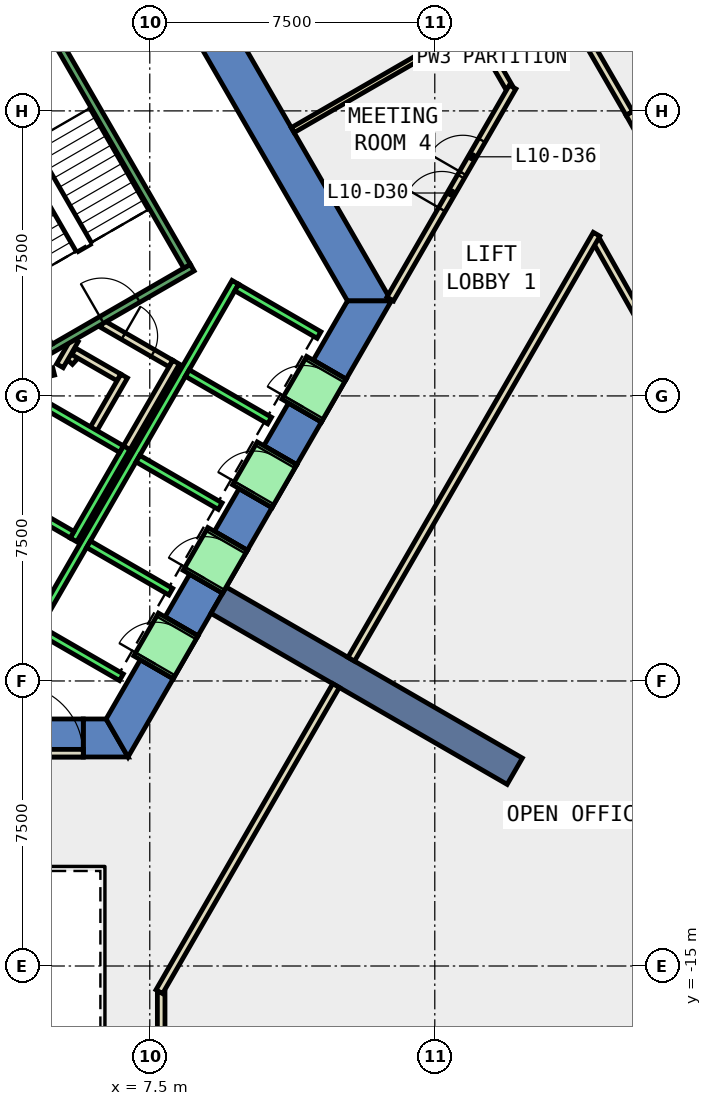
"""IFC4 building model, lengths in metres.
Left out: names, types, materials, properties, quantities, classifications, styles, units other than length and angle.
Written with IfcOpenShell. Run it as: python <this file> out.ifc"""

import sys

from ifc_helpers import new_model, si_unit, direction, frame, frame_2d, origin, place, context, subcontext, project, spatial, polyline, rectangle, outline, extrude, element, fill, save


model = new_model("IFC4")
c1 = context("Model", 3, precision=1e-05, world=origin(), true_north=direction((0.0, 1.0)))
c2 = subcontext(c1, "Body", "Model", "MODEL_VIEW")
j1 = project(units=[si_unit("LENGTHUNIT", "METRE"), si_unit("PLANEANGLEUNIT", "RADIAN")], contexts=[c1])
p1 = place(None, origin())
s1 = spatial("IfcSite", under=j1, at=p1, CompositionType="ELEMENT")
p2 = place(p1, origin())
s2 = spatial("IfcBuilding", under=s1, at=p2, CompositionType="ELEMENT")
p3 = place(p2, frame((0.0, 0.0, 51.8)))
s3 = spatial("IfcBuildingStorey", under=s2, at=p3, CompositionType="ELEMENT", Elevation=51.8)
p4 = place(p3, frame((0.0, 0.0, -0.4)))
e1 = element("IfcWall", 1, at=p4, inside=s3, PredefinedType="SHEAR", context=c2, shape_type="SweptSolid", body=[
    extrude(outline(polyline([(8.517, 11.748), (7.651, 11.248), (12.702, 2.5), (13.856, 2.5), (8.517, 11.748)])), origin(), (0.0, 0.0, 1.0), 4.2),
])
p5 = place(p3, frame((0.0, 0.0, -0.4)))
e2 = element("IfcWall", 2, at=p5, inside=s3, PredefinedType="SHEAR", context=c2, shape_type="SweptSolid", body=[
    extrude(outline(polyline([(5.75, -8.5), (5.75, -9.5), (6.928, -9.5), (6.351, -8.5), (5.75, -8.5)])), origin(), (0.0, 0.0, 1.0), 4.2),
])
p6 = place(p3, frame((0.0, 0.0, 3.6)))
e3 = element("IfcWall", 3, at=p6, inside=s3, PredefinedType="SHEAR", context=c2, shape_type="SweptSolid", body=[
    extrude(outline(polyline([(5.75, -9.5), (5.75, -8.5), (3.75, -8.5), (3.75, -9.5), (5.75, -9.5)])), origin(), (0.0, 0.0, 1.0), 0.2),
])
p7 = place(p3, frame((0.0, 0.0, -0.4)))
e4 = element("IfcWall", 4, at=p7, inside=s3, PredefinedType="SHEAR", context=c2, shape_type="SweptSolid", body=[
    extrude(outline(polyline([(8.117, -7.44), (7.252, -6.94), (6.351, -8.5), (6.928, -9.5), (8.117, -7.44)])), origin(), (0.0, 0.0, 1.0), 4.2),
])
p8 = place(p3, frame((0.0, 0.0, -0.4)))
e5 = element("IfcWall", 5, at=p8, inside=s3, PredefinedType="SHEAR", context=c2, shape_type="SweptSolid", body=[
    extrude(outline(polyline([(9.417, -5.189), (8.551, -4.689), (7.902, -5.814), (8.767, -6.314), (9.417, -5.189)])), origin(), (0.0, 0.0, 1.0), 4.2),
])
p9 = place(p3, frame((0.0, 0.0, -0.4)))
e6 = element("IfcWall", 6, at=p9, inside=s3, PredefinedType="SHEAR", context=c2, shape_type="SweptSolid", body=[
    extrude(outline(polyline([(10.717, -2.937), (9.851, -2.437), (9.201, -3.563), (10.067, -4.063), (10.717, -2.937)])), origin(), (0.0, 0.0, 1.0), 4.2),
])
p10 = place(p3, frame((0.0, 0.0, -0.4)))
e7 = element("IfcWall", 7, at=p10, inside=s3, PredefinedType="SHEAR", context=c2, shape_type="SweptSolid", body=[
    extrude(outline(polyline([(12.017, -0.686), (11.151, -0.186), (10.501, -1.311), (11.367, -1.811), (12.017, -0.686)])), origin(), (0.0, 0.0, 1.0), 4.2),
])
p11 = place(p3, frame((0.0, 0.0, -0.4)))
e8 = element("IfcWall", 8, at=p11, inside=s3, PredefinedType="SHEAR", context=c2, shape_type="SweptSolid", body=[
    extrude(outline(polyline([(11.801, 0.94), (12.667, 0.44), (13.856, 2.5), (12.702, 2.5), (11.801, 0.94)])), origin(), (0.0, 0.0, 1.0), 4.2),
])
p12 = place(p3, frame((0.0, 0.0, 3.6)))
e9 = element("IfcWall", 9, at=p12, inside=s3, PredefinedType="SHEAR", context=c2, shape_type="SweptSolid", body=[
    extrude(outline(polyline([(8.767, -6.314), (7.902, -5.814), (7.252, -6.94), (8.117, -7.44), (8.767, -6.314)])), origin(), (0.0, 0.0, 1.0), 0.2),
])
p13 = place(p3, frame((0.0, 0.0, 3.6)))
e10 = element("IfcWall", 10, at=p13, inside=s3, PredefinedType="SHEAR", context=c2, shape_type="SweptSolid", body=[
    extrude(outline(polyline([(10.067, -4.063), (9.201, -3.563), (8.551, -4.689), (9.417, -5.189), (10.067, -4.063)])), origin(), (0.0, 0.0, 1.0), 0.2),
])
p14 = place(p3, frame((0.0, 0.0, 3.6)))
e11 = element("IfcWall", 11, at=p14, inside=s3, PredefinedType="SHEAR", context=c2, shape_type="SweptSolid", body=[
    extrude(outline(polyline([(11.367, -1.811), (10.501, -1.311), (9.851, -2.437), (10.717, -2.937), (11.367, -1.811)])), origin(), (0.0, 0.0, 1.0), 0.2),
])
p15 = place(p3, frame((0.0, 0.0, 3.6)))
e12 = element("IfcWall", 12, at=p15, inside=s3, PredefinedType="SHEAR", context=c2, shape_type="SweptSolid", body=[
    extrude(outline(polyline([(12.667, 0.44), (11.801, 0.94), (11.151, -0.186), (12.017, -0.686), (12.667, 0.44)])), origin(), (0.0, 0.0, 1.0), 0.2),
])
p16 = place(p3, frame((9.31, -5.375, -0.4), z_axis=(0.0, 0.0, 1.0), x_axis=(0.866017533419, -0.500013631625, 0.0)))
e13 = element("IfcWall", 13, at=p16, inside=s3, PredefinedType="SHEAR", context=c2, shape_type="SweptSolid", body=[
    extrude(rectangle(XDim=9.0, YDim=0.8, at=frame_2d((4.5, 0.0))), origin(), (0.0, 0.0, 1.0), 4.2),
])
p17 = place(p3, frame((16.948, 8.128, 0.0), z_axis=(0.0, 0.0, 1.0), x_axis=(-0.499931460552, 0.866064971437, 0.0)))
e14 = element("IfcWall", 14, at=p17, inside=s3, PredefinedType="PARTITIONING", context=c2, shape_type="SweptSolid", body=[
    extrude(rectangle(XDim=1.786, YDim=0.2, at=frame_2d((0.893, 0.0))), origin(), (0.0, 0.0, 1.0), 3.8),
])
p18 = place(p3, frame((21.585, -0.045, 0.0), z_axis=(0.0, 0.0, 1.0), x_axis=(-0.491542684896, 0.870853483042, 0.0)))
e15 = element("IfcWall", 15, at=p18, inside=s3, PredefinedType="PARTITIONING", context=c2, shape_type="SweptSolid", body=[
    extrude(rectangle(XDim=4.738, YDim=0.2, at=frame_2d((2.369, 0.0))), origin(), (0.0, 0.0, 1.0), 3.8),
])
p19 = place(p3, frame((16.46, 13.772, 0.0), z_axis=(0.0, 0.0, 1.0), x_axis=(0.500099745063, -0.865967808286, 0.0)))
e16 = element("IfcWall", 16, at=p19, inside=s3, PredefinedType="PARTITIONING", context=c2, shape_type="SweptSolid", body=[
    extrude(rectangle(XDim=7.319, YDim=0.2, at=frame_2d((3.659, 0.0))), origin(), (0.0, 0.0, 1.0), 3.8),
])
p20 = place(p19, frame((3.159, 0.0, 0.0)))
e17 = element("IfcOpeningElement", 17, at=p20, cuts=e16, PredefinedType="OPENING", context=c2, shape_type="SweptSolid", body=[
    extrude(rectangle(XDim=1.0, YDim=2.1, at=frame_2d((0.5, 1.05))), frame((0.0, 0.11, 0.0), z_axis=(0.0, -1.0, 0.0), x_axis=(1.0, 0.0, 0.0)), (0.0, 0.0, 1.0), 0.22),
])
p21 = place(p3, frame((20.12, 7.434, 0.0), z_axis=(0.0, 0.0, 1.0), x_axis=(0.491394823876, -0.87093692485, 0.0)))
e18 = element("IfcWall", 18, at=p21, inside=s3, PredefinedType="PARTITIONING", context=c2, shape_type="SweptSolid", body=[
    extrude(rectangle(XDim=3.547, YDim=0.2, at=frame_2d((1.773, 0.0))), origin(), (0.0, 0.0, 1.0), 3.8),
])
p22 = place(p3, frame((5.39, 0.898, 0.0), z_axis=(0.0, 0.0, 1.0), x_axis=(0.673828488714, 0.738887791073, 0.0)))
e19 = element("IfcWall", 19, at=p22, inside=s3, PredefinedType="PARTITIONING", context=c2, shape_type="SweptSolid", body=[
    extrude(rectangle(XDim=0.263, YDim=0.2, at=frame_2d((0.131, 0.0))), origin(), (0.0, 0.0, 1.0), 3.8),
])
p23 = place(p3, frame((5.499, 1.172, 0.0), z_axis=(0.0, 0.0, 1.0), x_axis=(0.866333505267, -0.499465972466, 0.0)))
e20 = element("IfcWall", 20, at=p23, inside=s3, PredefinedType="PARTITIONING", context=c2, shape_type="SweptSolid", body=[
    extrude(rectangle(XDim=1.374, YDim=0.2, at=frame_2d((0.687, 0.0))), origin(), (0.0, 0.0, 1.0), 3.8),
])
p24 = place(p3, frame((6.826, 0.522, 0.0), z_axis=(0.0, 0.0, 1.0), x_axis=(-0.500016722714, -0.866015748706, 0.0)))
e21 = element("IfcWall", 21, at=p24, inside=s3, PredefinedType="PARTITIONING", context=c2, shape_type="SweptSolid", body=[
    extrude(rectangle(XDim=1.7, YDim=0.2, at=frame_2d((0.85, 0.0))), origin(), (0.0, 0.0, 1.0), 3.8),
])
p25 = place(p3, frame((6.25, 1.894, 0.0), z_axis=(0.0, 0.0, 1.0), x_axis=(0.866043184279, -0.499969202016, 0.0)))
e22 = element("IfcWall", 22, at=p25, inside=s3, PredefinedType="PARTITIONING", context=c2, shape_type="SweptSolid", body=[
    extrude(rectangle(XDim=2.084, YDim=0.2, at=frame_2d((1.042, 0.0))), origin(), (0.0, 0.0, 1.0), 3.8),
])
p26 = place(p25, frame((0.642, 0.0, 0.0)))
e23 = element("IfcOpeningElement", 23, at=p26, cuts=e22, PredefinedType="OPENING", context=c2, shape_type="SweptSolid", body=[
    extrude(rectangle(XDim=0.9, YDim=2.1, at=frame_2d((0.45, 1.05))), frame((0.0, 0.11, 0.0), z_axis=(0.0, -1.0, 0.0), x_axis=(1.0, 0.0, 0.0)), (0.0, 0.0, 1.0), 0.22),
])
p27 = place(p3, frame((8.192, 0.888, 0.0), z_axis=(0.0, 0.0, 1.0), x_axis=(-0.499940625693, -0.866059680843, 0.0)))
e24 = element("IfcWall", 24, at=p27, inside=s3, PredefinedType="PARTITIONING", context=c2, shape_type="SweptSolid", body=[
    extrude(rectangle(XDim=2.68, YDim=0.2, at=frame_2d((1.34, 0.0))), origin(), (0.0, 0.0, 1.0), 3.8),
])
p28 = place(p3, frame((5.135, 0.793, 0.0), z_axis=(0.0, 0.0, 1.0), x_axis=(0.499526442893, 0.866298639529, 0.0)))
e25 = element("IfcWall", 25, at=p28, inside=s3, PredefinedType="PARTITIONING", context=c2, shape_type="SweptSolid", body=[
    extrude(rectangle(XDim=0.791, YDim=0.2, at=frame_2d((0.396, 0.0))), origin(), (0.0, 0.0, 1.0), 3.8),
])
p29 = place(p3, frame((16.104, 9.79, 0.0), z_axis=(0.0, 0.0, 1.0), x_axis=(-0.866023462144, -0.500003363005, 0.0)))
e26 = element("IfcWall", 26, at=p29, inside=s3, PredefinedType="PARTITIONING", context=c2, shape_type="SweptSolid", body=[
    extrude(rectangle(XDim=5.592, YDim=0.15, at=frame_2d((2.796, 0.0))), origin(), (0.0, 0.0, 1.0), 3.8),
])
p30 = place(p3, frame((13.827, 2.55, 0.0), z_axis=(0.0, 0.0, 1.0), x_axis=(0.500093193185, 0.865971591988, 0.0)))
e27 = element("IfcWall", 27, at=p30, inside=s3, PredefinedType="PARTITIONING", context=c2, shape_type="SweptSolid", body=[
    extrude(rectangle(XDim=6.441, YDim=0.2, at=frame_2d((3.221, 0.0))), origin(), (0.0, 0.0, 1.0), 3.8),
])
p31 = place(p30, frame((2.721, 0.0, 0.0)))
e28 = element("IfcOpeningElement", 28, at=p31, cuts=e27, PredefinedType="OPENING", context=c2, shape_type="SweptSolid", body=[
    extrude(rectangle(XDim=1.0, YDim=2.1, at=frame_2d((0.5, 1.05))), frame((0.0, 0.11, 0.0), z_axis=(0.0, -1.0, 0.0), x_axis=(1.0, 0.0, 0.0)), (0.0, 0.0, 1.0), 0.22),
])
p32 = place(p30, frame((3.821, 0.0, 0.0)))
e29 = element("IfcOpeningElement", 29, at=p32, cuts=e27, PredefinedType="OPENING", context=c2, shape_type="SweptSolid", body=[
    extrude(rectangle(XDim=1.0, YDim=2.1, at=frame_2d((0.5, 1.05))), frame((0.0, 0.11, 0.0), z_axis=(0.0, -1.0, 0.0), x_axis=(1.0, 0.0, 0.0)), (0.0, 0.0, 1.0), 0.22),
])
p33 = place(p3, frame((4.644, 0.564, 0.0), z_axis=(0.0, 0.0, 1.0), x_axis=(0.969929076366, 0.243387729394, 0.0)))
e30 = element("IfcWall", 30, at=p33, inside=s3, PredefinedType="PARTITIONING", context=c2, shape_type="SweptSolid", body=[
    extrude(rectangle(XDim=0.337, YDim=0.2, at=frame_2d((0.168, 0.0))), origin(), (0.0, 0.0, 1.0), 3.8),
])
p34 = place(p3, frame((7.8, -15.69, 0.0), z_axis=(0.0, 0.0, 1.0), x_axis=(0.0, -1.0, 0.0)))
e31 = element("IfcWall", 31, at=p34, inside=s3, PredefinedType="PARTITIONING", context=c2, shape_type="SweptSolid", body=[
    extrude(rectangle(XDim=2.919, YDim=0.2, at=frame_2d((1.459, 0.0))), origin(), (0.0, 0.0, 1.0), 3.8),
])
p35 = place(p3, frame((19.257, 4.255, 0.0), z_axis=(0.0, 0.0, 1.0), x_axis=(-0.499978317034, -0.866037922089, 0.0)))
e32 = element("IfcWall", 32, at=p35, inside=s3, PredefinedType="PARTITIONING", context=c2, shape_type="SweptSolid", body=[
    extrude(rectangle(XDim=12.913, YDim=0.2, at=frame_2d((6.456, 0.0))), origin(), (0.0, 0.0, 1.0), 3.8),
])
p36 = place(p3, frame((3.75, -9.4, 0.0), z_axis=(0.0, 0.0, 1.0), x_axis=(1.0, 0.0, 0.0)))
e33 = element("IfcWall", 33, at=p36, inside=s3, PredefinedType="PARTITIONING", context=c2, shape_type="SweptSolid", body=[
    extrude(rectangle(XDim=2.0, YDim=0.2, at=frame_2d((1.0, 0.0))), origin(), (0.0, 0.0, 1.0), 2.4),
])
p37 = place(p36, frame((0.19, 0.0, 0.0)))
e34 = element("IfcOpeningElement", 34, at=p37, cuts=e33, PredefinedType="OPENING", context=c2, shape_type="SweptSolid", body=[
    extrude(rectangle(XDim=1.8, YDim=2.1, at=frame_2d((0.9, 1.05))), frame((0.0, 0.11, 0.0), z_axis=(0.0, -1.0, 0.0), x_axis=(1.0, 0.0, 0.0)), (0.0, 0.0, 1.0), 0.22),
])
p38 = place(p3, frame((12.401, -7.621, 0.0), z_axis=(0.0, 0.0, 1.0), x_axis=(-0.499983724212, -0.866034800411, 0.0)))
e35 = element("IfcWall", 35, at=p38, inside=s3, PredefinedType="PARTITIONING", context=c2, shape_type="SweptSolid", body=[
    extrude(rectangle(XDim=9.302, YDim=0.2, at=frame_2d((4.651, 0.0))), origin(), (0.0, 0.0, 1.0), 3.8),
])
p39 = place(p3, frame((5.492, -3.788, 0.0), z_axis=(0.0, 0.0, 1.0), x_axis=(0.500011755427, 0.866018616679, 0.0)))
e36 = element("IfcWall", 36, at=p39, inside=s3, PredefinedType="STANDARD", context=c2, shape_type="SweptSolid", body=[
    extrude(rectangle(XDim=2.8, YDim=0.2, at=frame_2d((1.4, 0.0))), origin(), (0.0, 0.0, 1.0), 3.8),
])
p40 = place(p3, frame((3.377, -2.452, 0.0), z_axis=(0.0, 0.0, 1.0), x_axis=(0.865955154139, -0.50012165622, 0.0)))
e37 = element("IfcWall", 37, at=p40, inside=s3, PredefinedType="STANDARD", context=c2, shape_type="SweptSolid", body=[
    extrude(rectangle(XDim=2.4, YDim=0.2, at=frame_2d((1.2, 0.0))), origin(), (0.0, 0.0, 1.0), 3.8),
])
p41 = place(p3, frame((4.677, -0.2, 0.0), z_axis=(0.0, 0.0, 1.0), x_axis=(0.865973769406, -0.500089422704, 0.0)))
e38 = element("IfcWall", 38, at=p41, inside=s3, PredefinedType="STANDARD", context=c2, shape_type="SweptSolid", body=[
    extrude(rectangle(XDim=2.399, YDim=0.2, at=frame_2d((1.2, 0.0))), origin(), (0.0, 0.0, 1.0), 3.8),
])
p42 = place(p3, frame((4.451, -6.19, 0.0), z_axis=(0.0, 0.0, 1.0), x_axis=(0.50000090737, 0.866024879913, 0.0)))
e39 = element("IfcWall", 39, at=p42, inside=s3, PredefinedType="STANDARD", context=c2, shape_type="SweptSolid", body=[
    extrude(rectangle(XDim=10.6, YDim=0.2, at=frame_2d((5.3, 0.0))), origin(), (0.0, 0.0, 1.0), 3.8),
])
for number, where, z_axis, x_axis in (
    (40, (4.588, -6.153, 0.0), (0.0, 0.0, 1.0), (0.866, -0.5, 0.0)),
    (41, (5.888, -3.902, 0.0), (0.0, 0.0, 1.0), (0.866, -0.5, 0.0)),
    (42, (7.188, -1.65, 0.0), (0.0, 0.0, 1.0), (0.866, -0.5, 0.0)),
    (43, (8.488, 0.602, 0.0), (0.0, 0.0, 1.0), (0.866, -0.5, 0.0)),
):
    element("IfcWall", number, at=place(p3, frame(where, z_axis=z_axis, x_axis=x_axis)), inside=s3, PredefinedType="STANDARD", context=c2, shape_type="SweptSolid", body=[
        extrude(rectangle(XDim=2.5, YDim=0.2, at=frame_2d((1.25, 0.0))), origin(), (0.0, 0.0, 1.0), 3.8),
    ])
p43 = place(p3, frame((9.788, 2.853, 0.0), z_axis=(0.0, 0.0, 1.0), x_axis=(0.865998541277, -0.500046524342, 0.0)))
e44 = element("IfcWall", 44, at=p43, inside=s3, PredefinedType="STANDARD", context=c2, shape_type="SweptSolid", body=[
    extrude(rectangle(XDim=2.5, YDim=0.2, at=frame_2d((1.25, 0.0))), origin(), (0.0, 0.0, 1.0), 3.8),
])
p44 = place(p3, frame((7.598, -7.14, 0.0), z_axis=(0.0, 0.0, 1.0), x_axis=(0.500362116554, 0.865816234728, 0.0)))
e45 = element("IfcWall", 45, at=p44, inside=s3, PredefinedType="STANDARD", context=c2, shape_type="SweptSolid", body=[
    extrude(rectangle(XDim=1.299, YDim=1.2, at=frame_2d((0.65, 0.0))), origin(), (0.0, 0.0, 1.0), 2.4),
])
p45 = place(p44, frame((0.1, 0.0, 0.0)))
e46 = element("IfcOpeningElement", 46, at=p45, cuts=e45, PredefinedType="OPENING", context=c2, shape_type="SweptSolid", body=[
    extrude(rectangle(XDim=1.1, YDim=2.3, at=frame_2d((0.55, 1.15))), frame((0.0, 0.61, 0.0), z_axis=(0.0, -1.0, 0.0), x_axis=(1.0, 0.0, 0.0)), (0.0, 0.0, 1.0), 1.22),
])
p46 = place(p3, frame((8.898, -4.889, 0.0), z_axis=(0.0, 0.0, 1.0), x_axis=(0.500036693733, 0.866004217611, 0.0)))
e47 = element("IfcWall", 47, at=p46, inside=s3, PredefinedType="STANDARD", context=c2, shape_type="SweptSolid", body=[
    extrude(rectangle(XDim=1.3, YDim=1.2, at=frame_2d((0.65, 0.0))), origin(), (0.0, 0.0, 1.0), 2.4),
])
p47 = place(p46, frame((0.1, 0.0, 0.0)))
e48 = element("IfcOpeningElement", 48, at=p47, cuts=e47, PredefinedType="OPENING", context=c2, shape_type="SweptSolid", body=[
    extrude(rectangle(XDim=1.1, YDim=2.3, at=frame_2d((0.55, 1.15))), frame((0.0, 0.61, 0.0), z_axis=(0.0, -1.0, 0.0), x_axis=(1.0, 0.0, 0.0)), (0.0, 0.0, 1.0), 1.22),
])
p48 = place(p3, frame((10.198, -2.637, 0.0), z_axis=(0.0, 0.0, 1.0), x_axis=(0.49989585183, 0.866085525409, 0.0)))
e49 = element("IfcWall", 49, at=p48, inside=s3, PredefinedType="STANDARD", context=c2, shape_type="SweptSolid", body=[
    extrude(rectangle(XDim=1.3, YDim=1.2, at=frame_2d((0.65, 0.0))), origin(), (0.0, 0.0, 1.0), 2.4),
])
p49 = place(p48, frame((0.1, 0.0, 0.0)))
e50 = element("IfcOpeningElement", 50, at=p49, cuts=e49, PredefinedType="OPENING", context=c2, shape_type="SweptSolid", body=[
    extrude(rectangle(XDim=1.1, YDim=2.3, at=frame_2d((0.55, 1.15))), frame((0.0, 0.61, 0.0), z_axis=(0.0, -1.0, 0.0), x_axis=(1.0, 0.0, 0.0)), (0.0, 0.0, 1.0), 1.22),
])
p50 = place(p3, frame((11.498, -0.385, 0.0), z_axis=(0.0, 0.0, 1.0), x_axis=(0.500221244143, 0.865897630733, 0.0)))
e51 = element("IfcWall", 51, at=p50, inside=s3, PredefinedType="STANDARD", context=c2, shape_type="SweptSolid", body=[
    extrude(rectangle(XDim=1.299, YDim=1.2, at=frame_2d((0.65, 0.0))), origin(), (0.0, 0.0, 1.0), 2.4),
])
p51 = place(p50, frame((0.1, 0.0, 0.0)))
e52 = element("IfcOpeningElement", 52, at=p51, cuts=e51, PredefinedType="OPENING", context=c2, shape_type="SweptSolid", body=[
    extrude(rectangle(XDim=1.1, YDim=2.3, at=frame_2d((0.55, 1.15))), frame((0.0, 0.61, 0.0), z_axis=(0.0, -1.0, 0.0), x_axis=(1.0, 0.0, 0.0)), (0.0, 0.0, 1.0), 1.22),
])
p52 = place(p3, frame((4.806, 1.176, 0.0), z_axis=(0.0, 0.0, 1.0), x_axis=(0.866059941101, 0.499940174841, 0.0)))
e53 = element("IfcWall", 53, at=p52, inside=s3, PredefinedType="STANDARD", context=c2, shape_type="SweptSolid", body=[
    extrude(rectangle(XDim=4.4, YDim=0.2, at=frame_2d((2.2, 0.0))), origin(), (0.0, 0.0, 1.0), 3.8),
])
p53 = place(p52, frame((1.65, 0.0, 0.0)))
e54 = element("IfcOpeningElement", 54, at=p53, cuts=e53, PredefinedType="OPENING", context=c2, shape_type="SweptSolid", body=[
    extrude(rectangle(XDim=1.1, YDim=2.2, at=frame_2d((0.55, 1.1))), frame((0.0, 0.11, 0.0), z_axis=(0.0, -1.0, 0.0), x_axis=(1.0, 0.0, 0.0)), (0.0, 0.0, 1.0), 0.22),
])
p54 = place(p3, frame((1.256, 7.324, 0.0), z_axis=(0.0, 0.0, 1.0), x_axis=(0.866046073146, 0.499964197906, 0.0)))
e55 = element("IfcWall", 55, at=p54, inside=s3, PredefinedType="STANDARD", context=c2, shape_type="SweptSolid", body=[
    extrude(rectangle(XDim=4.4, YDim=0.2, at=frame_2d((2.2, 0.0))), origin(), (0.0, 0.0, 1.0), 3.8),
])
p55 = place(p3, frame((8.48, 3.412, 0.0), z_axis=(0.0, 0.0, 1.0), x_axis=(-0.499978703459, 0.866037698999, 0.0)))
e56 = element("IfcWall", 56, at=p55, inside=s3, PredefinedType="STANDARD", context=c2, shape_type="SweptSolid", body=[
    extrude(rectangle(XDim=6.9, YDim=0.2, at=frame_2d((3.45, 0.0))), origin(), (0.0, 0.0, 1.0), 3.8),
])
p56 = place(p31, origin())
e57 = element("IfcDoor", 57, at=p56, inside=s3, OperationType="SINGLE_SWING_LEFT", PredefinedType="DOOR", context=c2, shape_type="SweptSolid", body=[
    extrude(rectangle(XDim=1.0, YDim=2.1, at=frame_2d((0.5, 1.05))), frame((0.0, 0.025, 0.0), z_axis=(0.0, -1.0, 0.0), x_axis=(1.0, 0.0, 0.0)), (0.0, 0.0, 1.0), 0.05),
])
fill(e28, e57)
p57 = place(p26, origin())
e58 = element("IfcDoor", 58, at=p57, inside=s3, OperationType="SINGLE_SWING_LEFT", PredefinedType="DOOR", context=c2, shape_type="SweptSolid", body=[
    extrude(rectangle(XDim=0.9, YDim=2.1, at=frame_2d((0.45, 1.05))), frame((0.0, 0.025, 0.0), z_axis=(0.0, -1.0, 0.0), x_axis=(1.0, 0.0, 0.0)), (0.0, 0.0, 1.0), 0.05),
])
fill(e23, e58)
p58 = place(p32, origin())
e59 = element("IfcDoor", 59, at=p58, inside=s3, OperationType="SINGLE_SWING_RIGHT", PredefinedType="DOOR", context=c2, shape_type="SweptSolid", body=[
    extrude(rectangle(XDim=1.0, YDim=2.1, at=frame_2d((0.5, 1.05))), frame((0.0, 0.025, 0.0), z_axis=(0.0, -1.0, 0.0), x_axis=(1.0, 0.0, 0.0)), (0.0, 0.0, 1.0), 0.05),
])
fill(e29, e59)
p59 = place(p37, origin())
e60 = element("IfcDoor", 60, at=p59, inside=s3, OperationType="DOUBLE_DOOR_SINGLE_SWING", PredefinedType="DOOR", context=c2, shape_type="SweptSolid", body=[
    extrude(rectangle(XDim=1.8, YDim=2.1, at=frame_2d((0.9, 1.05))), frame((0.0, 0.025, 0.0), z_axis=(0.0, -1.0, 0.0), x_axis=(1.0, 0.0, 0.0)), (0.0, 0.0, 1.0), 0.05),
])
fill(e34, e60)
p60 = place(p45, origin())
e61 = element("IfcDoor", 61, at=p60, inside=s3, OperationType="SLIDING_TO_LEFT", PredefinedType="DOOR", context=c2, shape_type="SweptSolid", body=[
    extrude(rectangle(XDim=1.1, YDim=2.3, at=frame_2d((0.55, 1.15))), frame((0.0, 0.025, 0.0), z_axis=(0.0, -1.0, 0.0), x_axis=(1.0, 0.0, 0.0)), (0.0, 0.0, 1.0), 0.05),
])
fill(e46, e61)
p61 = place(p47, origin())
e62 = element("IfcDoor", 62, at=p61, inside=s3, OperationType="SLIDING_TO_LEFT", PredefinedType="DOOR", context=c2, shape_type="SweptSolid", body=[
    extrude(rectangle(XDim=1.1, YDim=2.3, at=frame_2d((0.55, 1.15))), frame((0.0, 0.025, 0.0), z_axis=(0.0, -1.0, 0.0), x_axis=(1.0, 0.0, 0.0)), (0.0, 0.0, 1.0), 0.05),
])
fill(e48, e62)
p62 = place(p49, origin())
e63 = element("IfcDoor", 63, at=p62, inside=s3, OperationType="SLIDING_TO_LEFT", PredefinedType="DOOR", context=c2, shape_type="SweptSolid", body=[
    extrude(rectangle(XDim=1.1, YDim=2.3, at=frame_2d((0.55, 1.15))), frame((0.0, 0.025, 0.0), z_axis=(0.0, -1.0, 0.0), x_axis=(1.0, 0.0, 0.0)), (0.0, 0.0, 1.0), 0.05),
])
fill(e50, e63)
p63 = place(p51, origin())
e64 = element("IfcDoor", 64, at=p63, inside=s3, OperationType="SLIDING_TO_LEFT", PredefinedType="DOOR", context=c2, shape_type="SweptSolid", body=[
    extrude(rectangle(XDim=1.1, YDim=2.3, at=frame_2d((0.55, 1.15))), frame((0.0, 0.025, 0.0), z_axis=(0.0, -1.0, 0.0), x_axis=(1.0, 0.0, 0.0)), (0.0, 0.0, 1.0), 0.05),
])
fill(e52, e64)
p64 = place(p53, origin())
e65 = element("IfcDoor", 65, at=p64, inside=s3, OperationType="SINGLE_SWING_LEFT", PredefinedType="DOOR", context=c2, shape_type="SweptSolid", body=[
    extrude(rectangle(XDim=1.1, YDim=2.2, at=frame_2d((0.55, 1.1))), frame((0.0, 0.025, 0.0), z_axis=(0.0, -1.0, 0.0), x_axis=(1.0, 0.0, 0.0)), (0.0, 0.0, 1.0), 0.05),
])
fill(e54, e65)
save(model, sys.argv[1])
